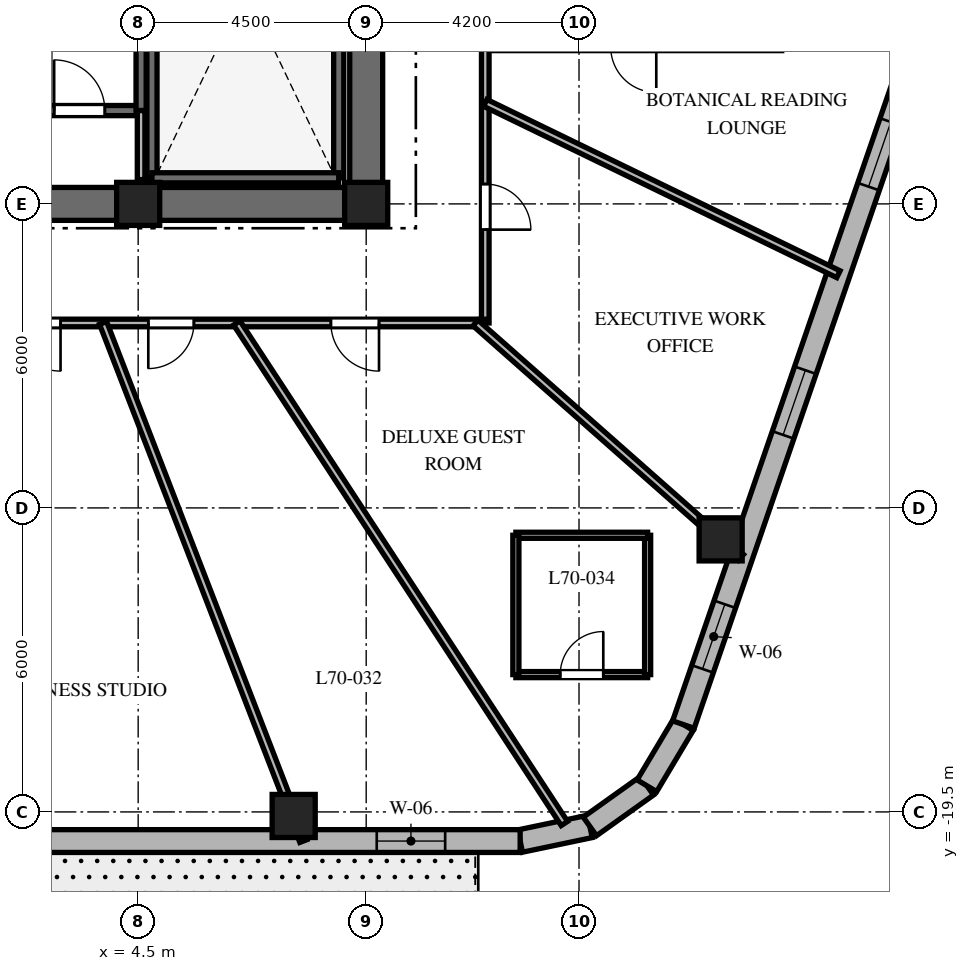
"""IFC4 building model, lengths in metres.
Left out: names, types, materials, properties, quantities, classifications, styles, units other than length and angle.
Written with IfcOpenShell. Run it as: python <this file> out.ifc"""

import sys

from ifc_helpers import new_model, si_unit, direction, frame, frame_2d, origin, origin_2d, place, context, subcontext, project, spatial, rectangle, extrude, element, fill, save


model = new_model("IFC4")
c1 = context("Model", 3, precision=1e-05, world=origin(), true_north=direction((0.0, 1.0)))
c2 = subcontext(c1, "Body", "Model", "MODEL_VIEW")
j1 = project(units=[si_unit("LENGTHUNIT", "METRE"), si_unit("PLANEANGLEUNIT", "RADIAN")], contexts=[c1])
p1 = place(None, origin())
s1 = spatial("IfcSite", under=j1, at=p1, CompositionType="ELEMENT")
p2 = place(p1, origin())
s2 = spatial("IfcBuilding", under=s1, at=p2, CompositionType="ELEMENT")
p3 = place(p2, frame((0.0, 0.0, 280.8)))
s3 = spatial("IfcBuildingStorey", under=s2, at=p3, CompositionType="ELEMENT", Elevation=280.8)
p4 = place(p3, frame((-9.325, -7.5, 0.0), z_axis=(0.0, 0.0, 1.0), x_axis=(1.0, 0.0, 0.0)))
e1 = element("IfcWall", 1, at=p4, inside=s3, PredefinedType="SHEAR", context=c2, shape_type="SweptSolid", body=[
    extrude(rectangle(XDim=18.65, YDim=0.65, at=frame_2d((9.325, 0.0))), origin(), (0.0, 0.0, 1.0), 3.9),
])
p5 = place(p4, frame((9.375, 0.0, 0.0)))
e2 = element("IfcOpeningElement", 2, at=p5, cuts=e1, PredefinedType="OPENING", context=c2, shape_type="SweptSolid", body=[
    extrude(rectangle(XDim=1.0, YDim=2.15, at=frame_2d((0.5, 1.075))), frame((0.0, 0.335, 0.0), z_axis=(0.0, -1.0, 0.0), x_axis=(1.0, 0.0, 0.0)), (0.0, 0.0, 1.0), 0.67),
])
p6 = place(p3, frame((9.0, -7.175, 0.0), z_axis=(0.0, 0.0, 1.0), x_axis=(0.0, 1.0, 0.0)))
e3 = element("IfcWall", 3, at=p6, inside=s3, PredefinedType="SHEAR", context=c2, shape_type="SweptSolid", body=[
    extrude(rectangle(XDim=14.35, YDim=0.65, at=frame_2d((7.175, 0.0))), origin(), (0.0, 0.0, 1.0), 3.9),
])
p7 = place(p6, frame((10.3, 0.0, 0.0)))
e4 = element("IfcOpeningElement", 4, at=p7, cuts=e3, PredefinedType="OPENING", context=c2, shape_type="SweptSolid", body=[
    extrude(rectangle(XDim=1.05, YDim=2.15, at=frame_2d((0.525, 1.075))), frame((0.0, 0.335, 0.0), z_axis=(0.0, -1.0, 0.0), x_axis=(1.0, 0.0, 0.0)), (0.0, 0.0, 1.0), 0.67),
])
for number, where, z_axis, x_axis in (
    (5, (4.772, -6.985, 0.0), (0.0, 0.0, 1.0), (0.0, 1.0, 0.0)),
    (6, (8.458, -6.985, 0.0), (0.0, 0.0, 1.0), (0.0, 1.0, 0.0)),
):
    element("IfcWall", number, at=place(p3, frame(where, z_axis=z_axis, x_axis=x_axis)), inside=s3, PredefinedType="SHEAR", context=c2, shape_type="SweptSolid", body=[
        extrude(rectangle(XDim=9.143, YDim=0.2, at=frame_2d((4.572, 0.0))), origin(), (0.0, 0.0, 1.0), 3.9),
    ])
p8 = place(p3, frame((4.772, -6.985, 0.0), z_axis=(0.0, 0.0, 1.0), x_axis=(1.0, 0.0, 0.0)))
e7 = element("IfcWall", 7, at=p8, inside=s3, PredefinedType="SHEAR", context=c2, shape_type="SweptSolid", body=[
    extrude(rectangle(XDim=3.686, YDim=0.2, at=frame_2d((1.843, 0.0))), origin(), (0.0, 0.0, 1.0), 3.9),
])
p9 = place(p3, frame((-4.608, -5.658, 0.0), z_axis=(0.0, 0.0, 1.0), x_axis=(1.0, 0.0, 0.0)))
e8 = element("IfcWall", 8, at=p9, inside=s3, PredefinedType="SHEAR", context=c2, shape_type="SweptSolid", body=[
    extrude(rectangle(XDim=9.166, YDim=0.2, at=frame_2d((4.583, 0.0))), origin(), (0.0, 0.0, 1.0), 3.9),
])
p10 = place(p9, frame((7.45, 0.0, 0.0)))
e9 = element("IfcOpeningElement", 9, at=p10, cuts=e8, PredefinedType="OPENING", context=c2, shape_type="SweptSolid", body=[
    extrude(rectangle(XDim=1.0, YDim=2.15, at=frame_2d((0.5, 1.075))), frame((0.0, 0.11, 0.0), z_axis=(0.0, -1.0, 0.0), x_axis=(1.0, 0.0, 0.0)), (0.0, 0.0, 1.0), 0.22),
])
p11 = place(p3, frame((4.558, -5.658, 0.0), z_axis=(0.0, 0.0, 1.0), x_axis=(0.0, 1.0, 0.0)))
e10 = element("IfcWall", 10, at=p11, inside=s3, PredefinedType="SHEAR", context=c2, shape_type="SweptSolid", body=[
    extrude(rectangle(XDim=3.686, YDim=0.2, at=frame_2d((1.843, 0.0))), origin(), (0.0, 0.0, 1.0), 3.9),
])
for number, where, z_axis, x_axis in (
    (11, (4.5, -7.5, 0.0), (0.0, 0.0, 1.0), (1.0, 0.0, 0.0)),
    (12, (9.0, -7.5, 0.0), (0.0, 0.0, 1.0), (1.0, 0.0, 0.0)),
    (13, (7.569, -19.58, 0.0), (0.0, 0.0, 1.0), (1.0, 0.0, 0.0)),
    (14, (15.995, -14.121, 0.0), (0.0, 0.0, 1.0), (1.0, 0.0, 0.0)),
):
    element("IfcColumn", number, at=place(p3, frame(where, z_axis=z_axis, x_axis=x_axis)), inside=s3, PredefinedType="COLUMN", context=c2, shape_type="SweptSolid", body=[
        extrude(rectangle(XDim=0.85, YDim=0.85, at=origin_2d()), origin(), (0.0, 0.0, 1.0), 3.9),
    ])
p12 = place(p3, frame((12.038, -20.075, 0.0), z_axis=(0.0, 0.0, 1.0), x_axis=(0.978750122553, 0.205056571711, 0.0)))
e15 = element("IfcWall", 15, at=p12, inside=s3, PredefinedType="SOLIDWALL", context=c2, shape_type="SweptSolid", body=[
    extrude(rectangle(XDim=1.406, YDim=0.45, at=frame_2d((0.703, 0.0))), origin(), (0.0, 0.0, 1.0), 3.6),
])
p13 = place(p3, frame((13.415, -19.787, 0.0), z_axis=(0.0, 0.0, 1.0), x_axis=(0.814055493997, 0.580787097561, 0.0)))
e16 = element("IfcWall", 16, at=p13, inside=s3, PredefinedType="SOLIDWALL", context=c2, shape_type="SweptSolid", body=[
    extrude(rectangle(XDim=1.383, YDim=0.45, at=frame_2d((0.691, 0.0))), origin(), (0.0, 0.0, 1.0), 3.6),
])
p14 = place(p3, frame((14.54, -18.984, 0.0), z_axis=(0.0, 0.0, 1.0), x_axis=(0.512374906623, 0.858761873317, 0.0)))
e17 = element("IfcWall", 17, at=p14, inside=s3, PredefinedType="SOLIDWALL", context=c2, shape_type="SweptSolid", body=[
    extrude(rectangle(XDim=1.406, YDim=0.45, at=frame_2d((0.703, 0.0))), origin(), (0.0, 0.0, 1.0), 3.6),
])
p15 = place(p3, frame((-10.379, -20.075, 0.0), z_axis=(0.0, 0.0, 1.0), x_axis=(1.0, 0.0, 0.0)))
e18 = element("IfcWall", 18, at=p15, inside=s3, PredefinedType="SOLIDWALL", context=c2, shape_type="SweptSolid", body=[
    extrude(rectangle(XDim=22.417, YDim=0.45, at=frame_2d((11.208, 0.0))), origin(), (0.0, 0.0, 1.0), 3.6),
])
p16 = place(p15, frame((2.302, 0.0, 0.0)))
e19 = element("IfcOpeningElement", 19, at=p16, cuts=e18, PredefinedType="OPENING", context=c2, shape_type="SweptSolid", body=[
    extrude(rectangle(XDim=1.0, YDim=2.15, at=frame_2d((0.5, 1.075))), frame((0.0, 0.235, 0.0), z_axis=(0.0, -1.0, 0.0), x_axis=(1.0, 0.0, 0.0)), (0.0, 0.0, 1.0), 0.47),
])
p17 = place(p15, frame((10.534, 0.0, 0.8)))
e20 = element("IfcOpeningElement", 20, at=p17, cuts=e18, PredefinedType="OPENING", context=c2, shape_type="SweptSolid", body=[
    extrude(rectangle(XDim=1.35, YDim=1.75, at=frame_2d((0.675, 0.875))), frame((0.0, 0.235, 0.0), z_axis=(0.0, -1.0, 0.0), x_axis=(1.0, 0.0, 0.0)), (0.0, 0.0, 1.0), 0.47),
])
p18 = place(p15, frame((19.587, 0.0, 0.8)))
e21 = element("IfcOpeningElement", 21, at=p18, cuts=e18, PredefinedType="OPENING", context=c2, shape_type="SweptSolid", body=[
    extrude(rectangle(XDim=1.35, YDim=1.75, at=frame_2d((0.675, 0.875))), frame((0.0, 0.235, 0.0), z_axis=(0.0, -1.0, 0.0), x_axis=(1.0, 0.0, 0.0)), (0.0, 0.0, 1.0), 0.47),
])
p19 = place(p3, frame((15.26, -17.776, 0.0), z_axis=(0.0, 0.0, 1.0), x_axis=(0.325407437101, 0.945573899745, 0.0)))
e22 = element("IfcWall", 22, at=p19, inside=s3, PredefinedType="SOLIDWALL", context=c2, shape_type="SweptSolid", body=[
    extrude(rectangle(XDim=18.552, YDim=0.45, at=frame_2d((9.276, 0.0))), origin(), (0.0, 0.0, 1.0), 3.6),
])
p20 = place(p19, frame((1.161, 0.0, 0.8)))
e23 = element("IfcOpeningElement", 23, at=p20, cuts=e22, PredefinedType="OPENING", context=c2, shape_type="SweptSolid", body=[
    extrude(rectangle(XDim=1.35, YDim=1.75, at=frame_2d((0.675, 0.875))), frame((0.0, 0.235, 0.0), z_axis=(0.0, -1.0, 0.0), x_axis=(1.0, 0.0, 0.0)), (0.0, 0.0, 1.0), 0.47),
])
p21 = place(p19, frame((6.046, 0.0, 0.8)))
e24 = element("IfcOpeningElement", 24, at=p21, cuts=e22, PredefinedType="OPENING", context=c2, shape_type="SweptSolid", body=[
    extrude(rectangle(XDim=1.35, YDim=1.75, at=frame_2d((0.675, 0.875))), frame((0.0, 0.235, 0.0), z_axis=(0.0, -1.0, 0.0), x_axis=(1.0, 0.0, 0.0)), (0.0, 0.0, 1.0), 0.47),
])
p22 = place(p19, frame((11.228, 0.0, 0.8)))
e25 = element("IfcOpeningElement", 25, at=p22, cuts=e22, PredefinedType="OPENING", context=c2, shape_type="SweptSolid", body=[
    extrude(rectangle(XDim=1.35, YDim=1.75, at=frame_2d((0.675, 0.875))), frame((0.0, 0.235, 0.0), z_axis=(0.0, -1.0, 0.0), x_axis=(1.0, 0.0, 0.0)), (0.0, 0.0, 1.0), 0.47),
])
p23 = place(p19, frame((15.987, 0.0, 0.8)))
e26 = element("IfcOpeningElement", 26, at=p23, cuts=e22, PredefinedType="OPENING", context=c2, shape_type="SweptSolid", body=[
    extrude(rectangle(XDim=1.35, YDim=1.75, at=frame_2d((0.675, 0.875))), frame((0.0, 0.235, 0.0), z_axis=(0.0, -1.0, 0.0), x_axis=(1.0, 0.0, 0.0)), (0.0, 0.0, 1.0), 0.47),
])
p24 = place(p3, frame((4.558, -7.02, 0.0), z_axis=(0.0, 0.0, 1.0), x_axis=(0.0, 1.0, 0.0)))
e27 = element("IfcWall", 27, at=p24, inside=s3, PredefinedType="PARTITIONING", context=c2, shape_type="SweptSolid", body=[
    extrude(rectangle(XDim=1.362, YDim=0.15, at=frame_2d((0.681, 0.0))), origin(), (0.0, 0.0, 1.0), 3.6),
])
p25 = place(p3, frame((11.35, -4.4, 0.0), z_axis=(0.0, 0.0, 1.0), x_axis=(0.0, -1.0, 0.0)))
e28 = element("IfcWall", 28, at=p25, inside=s3, PredefinedType="PARTITIONING", context=c2, shape_type="SweptSolid", body=[
    extrude(rectangle(XDim=5.45, YDim=0.15, at=frame_2d((2.725, 0.0))), origin(), (0.0, 0.0, 1.0), 3.09),
])
p26 = place(p25, frame((2.708, 0.0, 0.0)))
e29 = element("IfcOpeningElement", 29, at=p26, cuts=e28, PredefinedType="OPENING", context=c2, shape_type="SweptSolid", body=[
    extrude(rectangle(XDim=0.9, YDim=2.03, at=frame_2d((0.45, 1.015))), frame((0.0, 0.085, 0.0), z_axis=(0.0, -1.0, 0.0), x_axis=(1.0, 0.0, 0.0)), (0.0, 0.0, 1.0), 0.17),
])
p27 = place(p3, frame((11.35, -9.85, 0.0), z_axis=(0.0, 0.0, 1.0), x_axis=(-1.0, 0.0, 0.0)))
e30 = element("IfcWall", 30, at=p27, inside=s3, PredefinedType="PARTITIONING", context=c2, shape_type="SweptSolid", body=[
    extrude(rectangle(XDim=10.43, YDim=0.15, at=frame_2d((5.215, 0.0))), origin(), (0.0, 0.0, 1.0), 3.09),
])
p28 = place(p27, frame((8.382, 0.0, 0.0)))
e31 = element("IfcOpeningElement", 31, at=p28, cuts=e30, PredefinedType="OPENING", context=c2, shape_type="SweptSolid", body=[
    extrude(rectangle(XDim=0.95, YDim=2.03, at=frame_2d((0.475, 1.015))), frame((0.0, 0.085, 0.0), z_axis=(0.0, -1.0, 0.0), x_axis=(1.0, 0.0, 0.0)), (0.0, 0.0, 1.0), 0.17),
])
p29 = place(p27, frame((5.75, 0.0, 0.0)))
e32 = element("IfcOpeningElement", 32, at=p29, cuts=e30, PredefinedType="OPENING", context=c2, shape_type="SweptSolid", body=[
    extrude(rectangle(XDim=0.9, YDim=2.03, at=frame_2d((0.45, 1.015))), frame((0.0, 0.085, 0.0), z_axis=(0.0, -1.0, 0.0), x_axis=(1.0, 0.0, 0.0)), (0.0, 0.0, 1.0), 0.17),
])
p30 = place(p27, frame((2.097, 0.0, 0.0)))
e33 = element("IfcOpeningElement", 33, at=p30, cuts=e30, PredefinedType="OPENING", context=c2, shape_type="SweptSolid", body=[
    extrude(rectangle(XDim=0.95, YDim=2.03, at=frame_2d((0.475, 1.015))), frame((0.0, 0.085, 0.0), z_axis=(0.0, -1.0, 0.0), x_axis=(1.0, 0.0, 0.0)), (0.0, 0.0, 1.0), 0.17),
])
p31 = place(p3, frame((3.808, -9.85, 0.0), z_axis=(0.0, 0.0, 1.0), x_axis=(0.360587327934, -0.932725457427, 0.0)))
e34 = element("IfcWall", 34, at=p31, inside=s3, PredefinedType="PARTITIONING", context=c2, shape_type="SweptSolid", body=[
    extrude(rectangle(XDim=10.962, YDim=0.15, at=frame_2d((5.481, 0.0))), origin(), (0.0, 0.0, 1.0), 2.94),
])
p32 = place(p3, frame((6.446, -9.85, 0.0), z_axis=(0.0, 0.0, 1.0), x_axis=(0.547598105704, -0.836741486141, 0.0)))
e35 = element("IfcWall", 35, at=p32, inside=s3, PredefinedType="PARTITIONING", context=c2, shape_type="SweptSolid", body=[
    extrude(rectangle(XDim=11.806, YDim=0.15, at=frame_2d((5.903, 0.0))), origin(), (0.0, 0.0, 1.0), 2.94),
])
p33 = place(p3, frame((11.157, -9.85, 0.0), z_axis=(0.0, 0.0, 1.0), x_axis=(0.74966962095, -0.661812253909, 0.0)))
e36 = element("IfcWall", 36, at=p33, inside=s3, PredefinedType="PARTITIONING", context=c2, shape_type="SweptSolid", body=[
    extrude(rectangle(XDim=6.989, YDim=0.15, at=frame_2d((3.494, 0.0))), origin(), (0.0, 0.0, 1.0), 2.94),
])
p34 = place(p3, frame((11.35, -5.507, 0.0), z_axis=(0.0, 0.0, 1.0), x_axis=(0.899708724615, -0.436490791256, 0.0)))
e37 = element("IfcWall", 37, at=p34, inside=s3, PredefinedType="PARTITIONING", context=c2, shape_type="SweptSolid", body=[
    extrude(rectangle(XDim=7.746, YDim=0.15, at=frame_2d((3.873, 0.0))), origin(), (0.0, 0.0, 1.0), 2.94),
])
p35 = place(p3, frame((11.954, -16.79, 0.0), z_axis=(0.0, 0.0, 1.0), x_axis=(1.0, 0.0, 0.0)))
e38 = element("IfcWall", 38, at=p35, inside=s3, PredefinedType="PARTITIONING", context=c2, shape_type="SweptSolid", body=[
    extrude(rectangle(XDim=2.6, YDim=0.12, at=frame_2d((1.3, 0.0))), origin(), (0.0, 0.0, 1.0), 2.94),
])
p36 = place(p35, frame((0.875, 0.0, 0.0)))
e39 = element("IfcOpeningElement", 39, at=p36, cuts=e38, PredefinedType="OPENING", context=c2, shape_type="SweptSolid", body=[
    extrude(rectangle(XDim=0.85, YDim=2.03, at=frame_2d((0.425, 1.015))), frame((0.0, 0.07, 0.0), z_axis=(0.0, -1.0, 0.0), x_axis=(1.0, 0.0, 0.0)), (0.0, 0.0, 1.0), 0.14),
])
p37 = place(p3, frame((14.554, -16.79, 0.0), z_axis=(0.0, 0.0, 1.0), x_axis=(0.0, 1.0, 0.0)))
e40 = element("IfcWall", 40, at=p37, inside=s3, PredefinedType="PARTITIONING", context=c2, shape_type="SweptSolid", body=[
    extrude(rectangle(XDim=2.75, YDim=0.12, at=frame_2d((1.375, 0.0))), origin(), (0.0, 0.0, 1.0), 2.94),
])
p38 = place(p3, frame((14.554, -14.04, 0.0), z_axis=(0.0, 0.0, 1.0), x_axis=(-1.0, 0.0, 0.0)))
e41 = element("IfcWall", 41, at=p38, inside=s3, PredefinedType="PARTITIONING", context=c2, shape_type="SweptSolid", body=[
    extrude(rectangle(XDim=2.6, YDim=0.12, at=frame_2d((1.3, 0.0))), origin(), (0.0, 0.0, 1.0), 3.6),
])
p39 = place(p3, frame((11.954, -14.04, 0.0), z_axis=(0.0, 0.0, 1.0), x_axis=(0.0, -1.0, 0.0)))
e42 = element("IfcWall", 42, at=p39, inside=s3, PredefinedType="PARTITIONING", context=c2, shape_type="SweptSolid", body=[
    extrude(rectangle(XDim=2.75, YDim=0.12, at=frame_2d((1.375, 0.0))), origin(), (0.0, 0.0, 1.0), 2.94),
])
p40 = place(p18, origin())
e43 = element("IfcWindow", 43, at=p40, inside=s3, PartitioningType="SINGLE_PANEL", PredefinedType="WINDOW", context=c2, shape_type="SweptSolid", body=[
    extrude(rectangle(XDim=1.35, YDim=1.75, at=frame_2d((0.675, 0.875))), frame((0.0, 0.03, 0.0), z_axis=(0.0, -1.0, 0.0), x_axis=(1.0, 0.0, 0.0)), (0.0, 0.0, 1.0), 0.06),
])
fill(e21, e43)
p41 = place(p20, origin())
e44 = element("IfcWindow", 44, at=p41, inside=s3, PartitioningType="SINGLE_PANEL", PredefinedType="WINDOW", context=c2, shape_type="SweptSolid", body=[
    extrude(rectangle(XDim=1.35, YDim=1.75, at=frame_2d((0.675, 0.875))), frame((0.0, 0.03, 0.0), z_axis=(0.0, -1.0, 0.0), x_axis=(1.0, 0.0, 0.0)), (0.0, 0.0, 1.0), 0.06),
])
fill(e23, e44)
p42 = place(p21, origin())
e45 = element("IfcWindow", 45, at=p42, inside=s3, PartitioningType="SINGLE_PANEL", PredefinedType="WINDOW", context=c2, shape_type="SweptSolid", body=[
    extrude(rectangle(XDim=1.35, YDim=1.75, at=frame_2d((0.675, 0.875))), frame((0.0, 0.03, 0.0), z_axis=(0.0, -1.0, 0.0), x_axis=(1.0, 0.0, 0.0)), (0.0, 0.0, 1.0), 0.06),
])
fill(e24, e45)
p43 = place(p22, origin())
e46 = element("IfcWindow", 46, at=p43, inside=s3, PartitioningType="SINGLE_PANEL", PredefinedType="WINDOW", context=c2, shape_type="SweptSolid", body=[
    extrude(rectangle(XDim=1.35, YDim=1.75, at=frame_2d((0.675, 0.875))), frame((0.0, 0.03, 0.0), z_axis=(0.0, -1.0, 0.0), x_axis=(1.0, 0.0, 0.0)), (0.0, 0.0, 1.0), 0.06),
])
fill(e25, e46)
p44 = place(p10, origin())
e47 = element("IfcDoor", 47, at=p44, inside=s3, OperationType="SINGLE_SWING_LEFT", PredefinedType="DOOR", context=c2, shape_type="SweptSolid", body=[
    extrude(rectangle(XDim=1.0, YDim=2.15, at=frame_2d((0.5, 1.075))), frame((0.0, 0.025, 0.0), z_axis=(0.0, -1.0, 0.0), x_axis=(1.0, 0.0, 0.0)), (0.0, 0.0, 1.0), 0.05),
])
fill(e9, e47)
p45 = place(p28, origin())
e48 = element("IfcDoor", 48, at=p45, inside=s3, OperationType="SINGLE_SWING_LEFT", PredefinedType="DOOR", context=c2, shape_type="SweptSolid", body=[
    extrude(rectangle(XDim=0.95, YDim=2.03, at=frame_2d((0.475, 1.015))), frame((0.0, 0.025, 0.0), z_axis=(0.0, -1.0, 0.0), x_axis=(1.0, 0.0, 0.0)), (0.0, 0.0, 1.0), 0.05),
])
fill(e31, e48)
p46 = place(p29, origin())
e49 = element("IfcDoor", 49, at=p46, inside=s3, OperationType="SINGLE_SWING_RIGHT", PredefinedType="DOOR", context=c2, shape_type="SweptSolid", body=[
    extrude(rectangle(XDim=0.9, YDim=2.03, at=frame_2d((0.45, 1.015))), frame((0.0, 0.025, 0.0), z_axis=(0.0, -1.0, 0.0), x_axis=(1.0, 0.0, 0.0)), (0.0, 0.0, 1.0), 0.05),
])
fill(e32, e49)
p47 = place(p30, origin())
e50 = element("IfcDoor", 50, at=p47, inside=s3, OperationType="SINGLE_SWING_LEFT", PredefinedType="DOOR", context=c2, shape_type="SweptSolid", body=[
    extrude(rectangle(XDim=0.95, YDim=2.03, at=frame_2d((0.475, 1.015))), frame((0.0, 0.025, 0.0), z_axis=(0.0, -1.0, 0.0), x_axis=(1.0, 0.0, 0.0)), (0.0, 0.0, 1.0), 0.05),
])
fill(e33, e50)
p48 = place(p36, origin())
e51 = element("IfcDoor", 51, at=p48, inside=s3, OperationType="SINGLE_SWING_RIGHT", PredefinedType="DOOR", context=c2, shape_type="SweptSolid", body=[
    extrude(rectangle(XDim=0.85, YDim=2.03, at=frame_2d((0.425, 1.015))), frame((0.0, 0.025, 0.0), z_axis=(0.0, -1.0, 0.0), x_axis=(1.0, 0.0, 0.0)), (0.0, 0.0, 1.0), 0.05),
])
fill(e39, e51)
p49 = place(p26, origin())
e52 = element("IfcDoor", 52, at=p49, inside=s3, OperationType="SINGLE_SWING_RIGHT", PredefinedType="DOOR", context=c2, shape_type="SweptSolid", body=[
    extrude(rectangle(XDim=0.9, YDim=2.03, at=frame_2d((0.45, 1.015))), frame((0.0, 0.025, 0.0), z_axis=(0.0, -1.0, 0.0), x_axis=(1.0, 0.0, 0.0)), (0.0, 0.0, 1.0), 0.05),
])
fill(e29, e52)
save(model, sys.argv[1])
